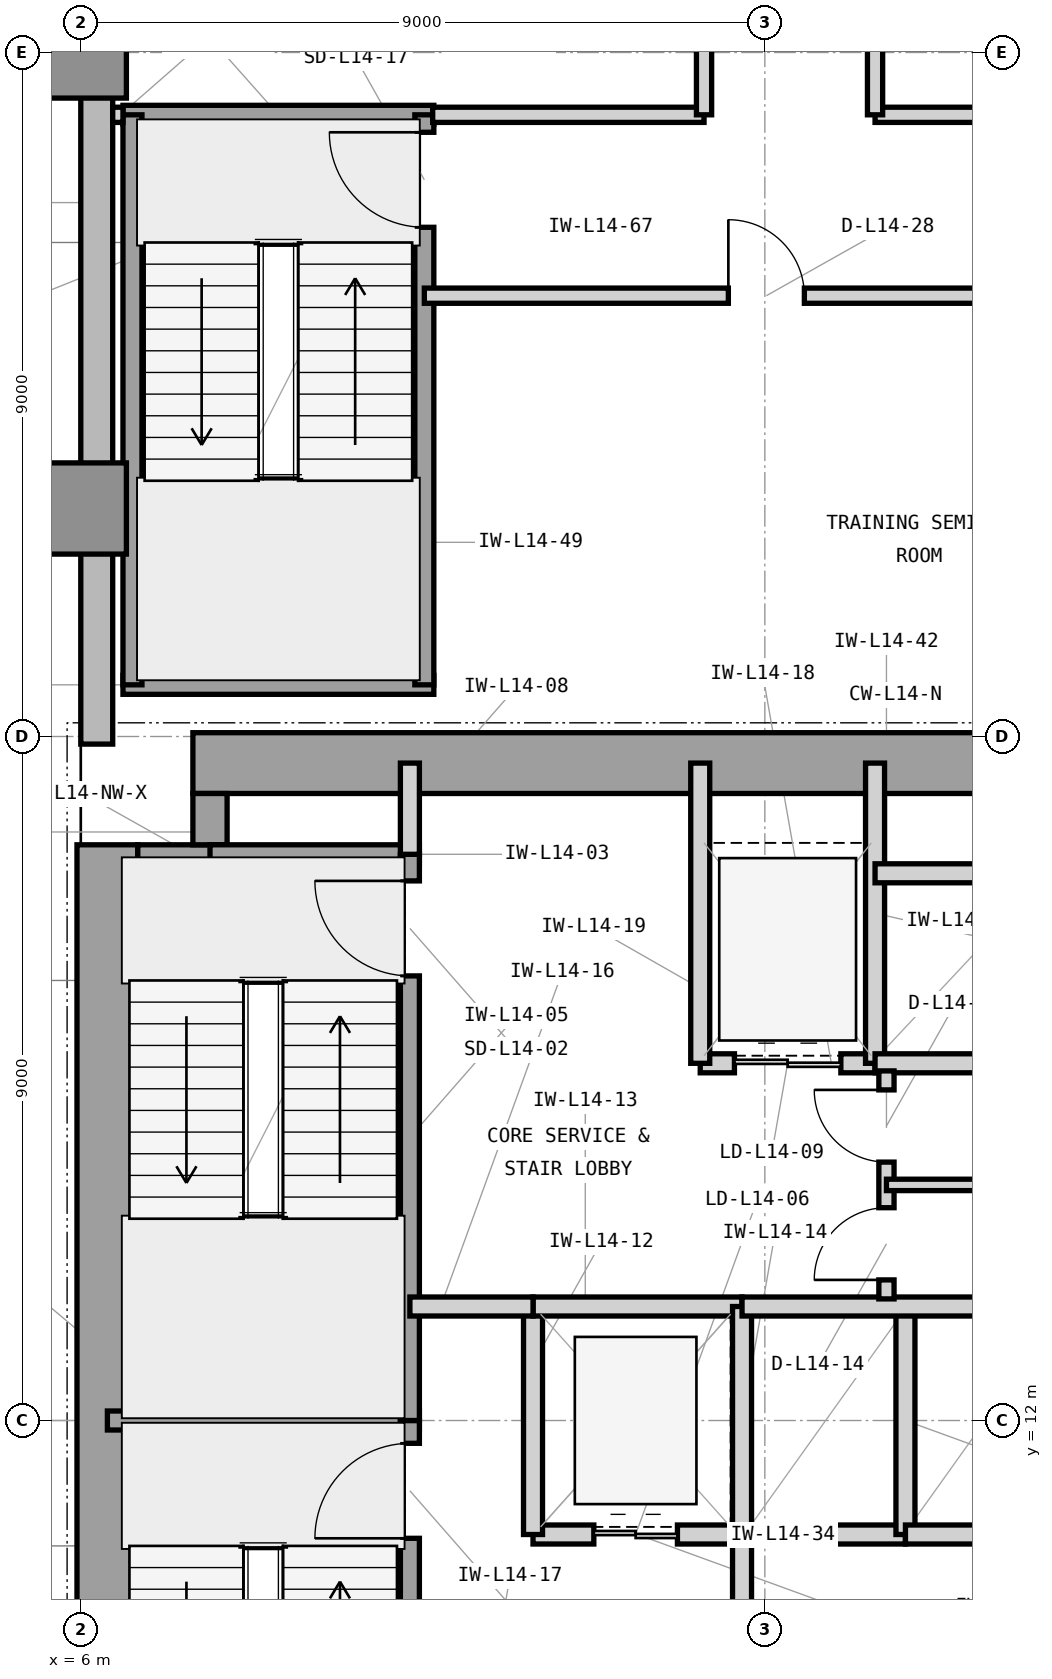
"""IFC4 building model, lengths in metres.
Left out: names, types, materials, properties, quantities, classifications, styles, units other than length and angle.
Written with IfcOpenShell. Run it as: python <this file> out.ifc"""

import sys

from ifc_helpers import new_model, si_unit, direction, frame, frame_2d, origin, origin_2d, place, context, subcontext, project, spatial, rectangle, extrude, element, fill, save


model = new_model("IFC4")
c1 = context("Model", 3, precision=1e-05, world=origin(), true_north=direction((0.0, 1.0)))
c2 = subcontext(c1, "Body", "Model", "MODEL_VIEW")
j1 = project(units=[si_unit("LENGTHUNIT", "METRE"), si_unit("PLANEANGLEUNIT", "RADIAN")], contexts=[c1])
p1 = place(None, origin())
s1 = spatial("IfcSite", under=j1, at=p1, CompositionType="ELEMENT")
p2 = place(p1, origin())
s2 = spatial("IfcBuilding", under=s1, at=p2, CompositionType="ELEMENT")
p3 = place(p2, frame((0.0, 0.0, 63.6)))
s3 = spatial("IfcBuildingStorey", under=s2, at=p3, CompositionType="ELEMENT", Elevation=63.6)
p4 = place(p3, frame((6.35, 4.425, 0.0), z_axis=(0.0, 0.0, 1.0), x_axis=(0.0, 1.0, 0.0)))
e1 = element("IfcWall", 1, at=p4, inside=s3, PredefinedType="SHEAR", context=c2, shape_type="SweptSolid", body=[
    extrude(rectangle(XDim=15.15, YDim=0.8, at=frame_2d((7.575, 0.0))), origin(), (0.0, 0.0, 1.0), 4.2),
])
p5 = place(p3, frame((7.475, 20.65, 0.0), z_axis=(0.0, 0.0, 1.0), x_axis=(1.0, 0.0, 0.0)))
e2 = element("IfcWall", 2, at=p5, inside=s3, PredefinedType="SHEAR", context=c2, shape_type="SweptSolid", body=[
    extrude(rectangle(XDim=12.325, YDim=0.8, at=frame_2d((6.163, 0.0))), origin(), (0.0, 0.0, 1.0), 4.2),
])
p6 = place(p3, frame((6.75, 19.35, 0.0), z_axis=(0.0, 0.0, 1.0), x_axis=(1.0, 0.0, 0.0)))
e3 = element("IfcWall", 3, at=p6, inside=s3, PredefinedType="SHEAR", context=c2, shape_type="SweptSolid", body=[
    extrude(rectangle(XDim=1.175, YDim=0.45, at=frame_2d((0.587, 0.0))), origin(), (0.0, 0.0, 1.0), 4.2),
])
p7 = place(p3, frame((7.7, 19.575, 0.0), z_axis=(0.0, 0.0, 1.0), x_axis=(0.0, 1.0, 0.0)))
e4 = element("IfcWall", 4, at=p7, inside=s3, PredefinedType="SHEAR", context=c2, shape_type="SweptSolid", body=[
    extrude(rectangle(XDim=0.675, YDim=0.45, at=frame_2d((0.337, 0.0))), origin(), (0.0, 0.0, 1.0), 4.2),
])
for number, where, z_axis, x_axis in (
    (5, (6.0, 24.0, 0.0), (0.0, 0.0, 1.0), (1.0, 0.0, 0.0)),
    (6, (6.0, 30.0, 0.0), (0.0, 0.0, 1.0), (1.0, 0.0, 0.0)),
):
    element("IfcColumn", number, at=place(p3, frame(where, z_axis=z_axis, x_axis=x_axis)), inside=s3, PredefinedType="COLUMN", context=c2, shape_type="SweptSolid", body=[
        extrude(rectangle(XDim=1.2, YDim=1.2, at=origin_2d()), origin(), (0.0, 0.0, 1.0), 4.2),
    ])
p8 = place(p3, frame((6.21, 49.4, 0.0), z_axis=(0.0, 0.0, 1.0), x_axis=(0.0, -1.0, 0.0)))
e7 = element("IfcWall", 7, at=p8, inside=s3, PredefinedType="STANDARD", context=c2, shape_type="SweptSolid", body=[
    extrude(rectangle(XDim=28.5, YDim=0.42, at=frame_2d((14.25, 0.0))), origin(), (0.0, 0.0, 1.0), 3.98),
])
p9 = place(p8, frame((15.225, 0.0, 0.85)))
e8 = element("IfcOpeningElement", 8, at=p9, cuts=e7, PredefinedType="OPENING", context=c2, shape_type="SweptSolid", body=[
    extrude(rectangle(XDim=2.8, YDim=2.45, at=frame_2d((1.4, 1.225))), frame((0.0, 0.22, 0.0), z_axis=(0.0, -1.0, 0.0), x_axis=(1.0, 0.0, 0.0)), (0.0, 0.0, 1.0), 0.44),
])
p10 = place(p3, frame((6.35, 12.0, 0.0), z_axis=(0.0, 0.0, 1.0), x_axis=(1.0, 0.0, 0.0)))
e9 = element("IfcWall", 9, at=p10, inside=s3, PredefinedType="SHEAR", context=c2, shape_type="SweptSolid", body=[
    extrude(rectangle(XDim=4.105, YDim=0.25, at=frame_2d((2.052, 0.0))), origin(), (0.0, 0.0, 1.0), 4.2),
])
p11 = place(p3, frame((7.7, 19.45, 0.0), z_axis=(0.0, 0.0, 1.0), x_axis=(1.0, 0.0, 0.0)))
e10 = element("IfcWall", 10, at=p11, inside=s3, PredefinedType="SHEAR", context=c2, shape_type="SweptSolid", body=[
    extrude(rectangle(XDim=2.755, YDim=0.25, at=frame_2d((1.377, 0.0))), origin(), (0.0, 0.0, 1.0), 4.2),
])
p12 = place(p3, frame((10.33, 4.55, 0.0), z_axis=(0.0, 0.0, 1.0), x_axis=(0.0, 1.0, 0.0)))
e11 = element("IfcWall", 11, at=p12, inside=s3, PredefinedType="SHEAR", context=c2, shape_type="SweptSolid", body=[
    extrude(rectangle(XDim=7.45, YDim=0.25, at=frame_2d((3.725, 0.0))), origin(), (0.0, 0.0, 1.0), 4.2),
])
p13 = place(p12, frame((5.9, 0.0, 0.0)))
e12 = element("IfcOpeningElement", 12, at=p13, cuts=e11, PredefinedType="OPENING", context=c2, shape_type="SweptSolid", body=[
    extrude(rectangle(XDim=1.25, YDim=2.2, at=frame_2d((0.625, 1.1))), frame((0.0, 0.135, 0.0), z_axis=(0.0, -1.0, 0.0), x_axis=(1.0, 0.0, 0.0)), (0.0, 0.0, 1.0), 0.27),
])
p14 = place(p3, frame((10.33, 12.0, 0.0), z_axis=(0.0, 0.0, 1.0), x_axis=(0.0, 1.0, 0.0)))
e13 = element("IfcWall", 13, at=p14, inside=s3, PredefinedType="SHEAR", context=c2, shape_type="SweptSolid", body=[
    extrude(rectangle(XDim=7.45, YDim=0.25, at=frame_2d((3.725, 0.0))), origin(), (0.0, 0.0, 1.0), 4.2),
])
p15 = place(p14, frame((5.85, 0.0, 0.0)))
e14 = element("IfcOpeningElement", 14, at=p15, cuts=e13, PredefinedType="OPENING", context=c2, shape_type="SweptSolid", body=[
    extrude(rectangle(XDim=1.25, YDim=2.2, at=frame_2d((0.625, 1.1))), frame((0.0, 0.135, 0.0), z_axis=(0.0, -1.0, 0.0), x_axis=(1.0, 0.0, 0.0)), (0.0, 0.0, 1.0), 0.27),
])
p16 = place(p3, frame((10.33, 19.45, 0.0), z_axis=(0.0, 0.0, 1.0), x_axis=(0.0, 1.0, 0.0)))
e15 = element("IfcWall", 15, at=p16, inside=s3, PredefinedType="PARTITIONING", context=c2, shape_type="SweptSolid", body=[
    extrude(rectangle(XDim=1.2, YDim=0.25, at=frame_2d((0.6, 0.0))), origin(), (0.0, 0.0, 1.0), 3.114),
])
p17 = place(p3, frame((11.95, 10.5, 0.0), z_axis=(0.0, 0.0, 1.0), x_axis=(1.0, 0.0, 0.0)))
e16 = element("IfcWall", 16, at=p17, inside=s3, PredefinedType="PARTITIONING", context=c2, shape_type="SweptSolid", body=[
    extrude(rectangle(XDim=2.75, YDim=0.25, at=frame_2d((1.375, 0.0))), origin(), (0.0, 0.0, 1.0), 3.426),
])
p18 = place(p17, frame((0.8, 0.0, 0.0)))
e17 = element("IfcOpeningElement", 17, at=p18, cuts=e16, PredefinedType="OPENING", context=c2, shape_type="SweptSolid", body=[
    extrude(rectangle(XDim=1.1, YDim=2.25, at=frame_2d((0.55, 1.125))), frame((0.0, 0.135, 0.0), z_axis=(0.0, -1.0, 0.0), x_axis=(1.0, 0.0, 0.0)), (0.0, 0.0, 1.0), 0.27),
])
p19 = place(p3, frame((11.95, 10.5, 0.0), z_axis=(0.0, 0.0, 1.0), x_axis=(0.0, 1.0, 0.0)))
e18 = element("IfcWall", 18, at=p19, inside=s3, PredefinedType="PARTITIONING", context=c2, shape_type="SweptSolid", body=[
    extrude(rectangle(XDim=3.0, YDim=0.25, at=frame_2d((1.5, 0.0))), origin(), (0.0, 0.0, 1.0), 3.97),
])
p20 = place(p3, frame((11.95, 13.5, 0.0), z_axis=(0.0, 0.0, 1.0), x_axis=(1.0, 0.0, 0.0)))
e19 = element("IfcWall", 19, at=p20, inside=s3, PredefinedType="PARTITIONING", context=c2, shape_type="SweptSolid", body=[
    extrude(rectangle(XDim=2.75, YDim=0.25, at=frame_2d((1.375, 0.0))), origin(), (0.0, 0.0, 1.0), 3.426),
])
p21 = place(p3, frame((14.7, 10.5, 0.0), z_axis=(0.0, 0.0, 1.0), x_axis=(0.0, 1.0, 0.0)))
e20 = element("IfcWall", 20, at=p21, inside=s3, PredefinedType="PARTITIONING", context=c2, shape_type="SweptSolid", body=[
    extrude(rectangle(XDim=3.0, YDim=0.25, at=frame_2d((1.5, 0.0))), origin(), (0.0, 0.0, 1.0), 3.97),
])
p22 = place(p3, frame((14.7, 6.7, 0.0), z_axis=(0.0, 0.0, 1.0), x_axis=(0.0, 1.0, 0.0)))
e21 = element("IfcWall", 21, at=p22, inside=s3, PredefinedType="PARTITIONING", context=c2, shape_type="SweptSolid", body=[
    extrude(rectangle(XDim=3.8, YDim=0.25, at=frame_2d((1.9, 0.0))), origin(), (0.0, 0.0, 1.0), 3.97),
])
p23 = place(p22, frame((1.3, 0.0, 0.0)))
e22 = element("IfcOpeningElement", 22, at=p23, cuts=e21, PredefinedType="OPENING", context=c2, shape_type="SweptSolid", body=[
    extrude(rectangle(XDim=1.2, YDim=2.2, at=frame_2d((0.6, 1.1))), frame((0.0, 0.135, 0.0), z_axis=(0.0, -1.0, 0.0), x_axis=(1.0, 0.0, 0.0)), (0.0, 0.0, 1.0), 0.27),
])
p24 = place(p3, frame((10.33, 13.5, 0.0), z_axis=(0.0, 0.0, 1.0), x_axis=(1.0, 0.0, 0.0)))
e23 = element("IfcWall", 23, at=p24, inside=s3, PredefinedType="PARTITIONING", context=c2, shape_type="SweptSolid", body=[
    extrude(rectangle(XDim=1.62, YDim=0.25, at=frame_2d((0.81, 0.0))), origin(), (0.0, 0.0, 1.0), 3.426),
])
p25 = place(p3, frame((14.15, 16.7, 0.0), z_axis=(0.0, 0.0, 1.0), x_axis=(1.0, 0.0, 0.0)))
e24 = element("IfcWall", 24, at=p25, inside=s3, PredefinedType="PARTITIONING", context=c2, shape_type="SweptSolid", body=[
    extrude(rectangle(XDim=2.3, YDim=0.25, at=frame_2d((1.15, 0.0))), origin(), (0.0, 0.0, 1.0), 3.426),
])
p26 = place(p25, frame((0.45, 0.0, 0.0)))
e25 = element("IfcOpeningElement", 25, at=p26, cuts=e24, PredefinedType="OPENING", context=c2, shape_type="SweptSolid", body=[
    extrude(rectangle(XDim=1.4, YDim=2.35, at=frame_2d((0.7, 1.175))), frame((0.0, 0.135, 0.0), z_axis=(0.0, -1.0, 0.0), x_axis=(1.0, 0.0, 0.0)), (0.0, 0.0, 1.0), 0.27),
])
for number, where, z_axis, x_axis in (
    (26, (14.15, 16.7, 0.0), (0.0, 0.0, 1.0), (0.0, 1.0, 0.0)),
    (27, (16.45, 16.7, 0.0), (0.0, 0.0, 1.0), (0.0, 1.0, 0.0)),
):
    element("IfcWall", number, at=place(p3, frame(where, z_axis=z_axis, x_axis=x_axis)), inside=s3, PredefinedType="PARTITIONING", context=c2, shape_type="SweptSolid", body=[
        extrude(rectangle(XDim=3.95, YDim=0.25, at=frame_2d((1.975, 0.0))), origin(), (0.0, 0.0, 1.0), 3.97),
    ])
p27 = place(p3, frame((16.45, 16.7, 0.0), z_axis=(0.0, 0.0, 1.0), x_axis=(1.0, 0.0, 0.0)))
e28 = element("IfcWall", 28, at=p27, inside=s3, PredefinedType="PARTITIONING", context=c2, shape_type="SweptSolid", body=[
    extrude(rectangle(XDim=2.3, YDim=0.25, at=frame_2d((1.15, 0.0))), origin(), (0.0, 0.0, 1.0), 3.426),
])
p28 = place(p3, frame((16.45, 19.2, 0.0), z_axis=(0.0, 0.0, 1.0), x_axis=(1.0, 0.0, 0.0)))
e29 = element("IfcWall", 29, at=p28, inside=s3, PredefinedType="PARTITIONING", context=c2, shape_type="SweptSolid", body=[
    extrude(rectangle(XDim=7.2, YDim=0.25, at=frame_2d((3.6, 0.0))), origin(), (0.0, 0.0, 1.0), 3.97),
])
p29 = place(p3, frame((14.7, 10.5, 0.0), z_axis=(0.0, 0.0, 1.0), x_axis=(1.0, 0.0, 0.0)))
e30 = element("IfcWall", 30, at=p29, inside=s3, PredefinedType="PARTITIONING", context=c2, shape_type="SweptSolid", body=[
    extrude(rectangle(XDim=2.15, YDim=0.25, at=frame_2d((1.075, 0.0))), origin(), (0.0, 0.0, 1.0), 3.426),
])
p30 = place(p3, frame((16.85, 10.5, 0.0), z_axis=(0.0, 0.0, 1.0), x_axis=(0.0, 1.0, 0.0)))
e31 = element("IfcWall", 31, at=p30, inside=s3, PredefinedType="PARTITIONING", context=c2, shape_type="SweptSolid", body=[
    extrude(rectangle(XDim=3.0, YDim=0.25, at=frame_2d((1.5, 0.0))), origin(), (0.0, 0.0, 1.0), 3.97),
])
p31 = place(p3, frame((16.85, 10.5, 0.0), z_axis=(0.0, 0.0, 1.0), x_axis=(1.0, 0.0, 0.0)))
e32 = element("IfcWall", 32, at=p31, inside=s3, PredefinedType="PARTITIONING", context=c2, shape_type="SweptSolid", body=[
    extrude(rectangle(XDim=2.1, YDim=0.25, at=frame_2d((1.05, 0.0))), origin(), (0.0, 0.0, 1.0), 3.426),
])
p32 = place(p3, frame((14.7, 13.5, 0.0), z_axis=(0.0, 0.0, 1.0), x_axis=(1.0, 0.0, 0.0)))
e33 = element("IfcWall", 33, at=p32, inside=s3, PredefinedType="PARTITIONING", context=c2, shape_type="SweptSolid", body=[
    extrude(rectangle(XDim=8.95, YDim=0.25, at=frame_2d((4.475, 0.0))), origin(), (0.0, 0.0, 1.0), 3.426),
])
p33 = place(p3, frame((16.6, 13.6, 0.0), z_axis=(0.0, 0.0, 1.0), x_axis=(0.0, 1.0, 0.0)))
e34 = element("IfcWall", 34, at=p33, inside=s3, PredefinedType="PARTITIONING", context=c2, shape_type="SweptSolid", body=[
    extrude(rectangle(XDim=3.0, YDim=0.2, at=frame_2d((1.5, 0.0))), origin(), (0.0, 0.0, 1.0), 3.97),
])
p34 = place(p33, frame((0.25, 0.0, 0.0)))
e35 = element("IfcOpeningElement", 35, at=p34, cuts=e34, PredefinedType="OPENING", context=c2, shape_type="SweptSolid", body=[
    extrude(rectangle(XDim=0.95, YDim=2.1, at=frame_2d((0.475, 1.05))), frame((0.0, 0.11, 0.0), z_axis=(0.0, -1.0, 0.0), x_axis=(1.0, 0.0, 0.0)), (0.0, 0.0, 1.0), 0.22),
])
p35 = place(p33, frame((1.8, 0.0, 0.0)))
e36 = element("IfcOpeningElement", 36, at=p35, cuts=e34, PredefinedType="OPENING", context=c2, shape_type="SweptSolid", body=[
    extrude(rectangle(XDim=0.95, YDim=2.1, at=frame_2d((0.475, 1.05))), frame((0.0, 0.11, 0.0), z_axis=(0.0, -1.0, 0.0), x_axis=(1.0, 0.0, 0.0)), (0.0, 0.0, 1.0), 0.22),
])
p36 = place(p3, frame((16.6, 15.1, 0.0), z_axis=(0.0, 0.0, 1.0), x_axis=(1.0, 0.0, 0.0)))
e37 = element("IfcWall", 37, at=p36, inside=s3, PredefinedType="PARTITIONING", context=c2, shape_type="SweptSolid", body=[
    extrude(rectangle(XDim=3.95, YDim=0.15, at=frame_2d((1.975, 0.0))), origin(), (0.0, 0.0, 1.0), 3.97),
])
for number, where, z_axis, x_axis in (
    (38, (6.555, 21.68, 0.0), (0.0, 0.0, 1.0), (1.0, 0.0, 0.0)),
    (39, (6.555, 29.18, 0.0), (0.0, 0.0, 1.0), (1.0, 0.0, 0.0)),
):
    element("IfcWall", number, at=place(p3, frame(where, z_axis=z_axis, x_axis=x_axis)), inside=s3, PredefinedType="SHEAR", context=c2, shape_type="SweptSolid", body=[
        extrude(rectangle(XDim=4.09, YDim=0.25, at=frame_2d((2.045, 0.0))), origin(), (0.0, 0.0, 1.0), 4.2),
    ])
p37 = place(p3, frame((6.68, 21.68, 0.0), z_axis=(0.0, 0.0, 1.0), x_axis=(0.0, 1.0, 0.0)))
e40 = element("IfcWall", 40, at=p37, inside=s3, PredefinedType="SHEAR", context=c2, shape_type="SweptSolid", body=[
    extrude(rectangle(XDim=7.5, YDim=0.25, at=frame_2d((3.75, 0.0))), origin(), (0.0, 0.0, 1.0), 4.2),
])
p38 = place(p3, frame((10.52, 21.68, 0.0), z_axis=(0.0, 0.0, 1.0), x_axis=(0.0, 1.0, 0.0)))
e41 = element("IfcWall", 41, at=p38, inside=s3, PredefinedType="SHEAR", context=c2, shape_type="SweptSolid", body=[
    extrude(rectangle(XDim=7.5, YDim=0.25, at=frame_2d((3.75, 0.0))), origin(), (0.0, 0.0, 1.0), 4.2),
])
p39 = place(p38, frame((6.02, 0.0, 0.0)))
e42 = element("IfcOpeningElement", 42, at=p39, cuts=e41, PredefinedType="OPENING", context=c2, shape_type="SweptSolid", body=[
    extrude(rectangle(XDim=1.25, YDim=2.2, at=frame_2d((0.625, 1.1))), frame((0.0, 0.135, 0.0), z_axis=(0.0, -1.0, 0.0), x_axis=(1.0, 0.0, 0.0)), (0.0, 0.0, 1.0), 0.27),
])
p40 = place(p3, frame((10.52, 26.8, 0.0), z_axis=(0.0, 0.0, 1.0), x_axis=(1.0, 0.0, 0.0)))
e43 = element("IfcWall", 43, at=p40, inside=s3, PredefinedType="PARTITIONING", context=c2, shape_type="SweptSolid", body=[
    extrude(rectangle(XDim=9.28, YDim=0.2, at=frame_2d((4.64, 0.0))), origin(), (0.0, 0.0, 1.0), 3.97),
])
p41 = place(p40, frame((4.0, 0.0, 0.0)))
e44 = element("IfcOpeningElement", 44, at=p41, cuts=e43, PredefinedType="OPENING", context=c2, shape_type="SweptSolid", body=[
    extrude(rectangle(XDim=1.0, YDim=2.15, at=frame_2d((0.5, 1.075))), frame((0.0, 0.11, 0.0), z_axis=(0.0, -1.0, 0.0), x_axis=(1.0, 0.0, 0.0)), (0.0, 0.0, 1.0), 0.22),
])
p42 = place(p3, frame((6.42, 29.18, 0.0), z_axis=(0.0, 0.0, 1.0), x_axis=(1.0, 0.0, 0.0)))
e45 = element("IfcWall", 45, at=p42, inside=s3, PredefinedType="PARTITIONING", context=c2, shape_type="SweptSolid", body=[
    extrude(rectangle(XDim=0.135, YDim=0.2, at=frame_2d((0.067, 0.0))), origin(), (0.0, 0.0, 1.0), 3.97),
])
p43 = place(p3, frame((10.63, 29.18, 0.0), z_axis=(0.0, 0.0, 1.0), x_axis=(1.0, 0.0, 0.0)))
e46 = element("IfcWall", 46, at=p43, inside=s3, PredefinedType="PARTITIONING", context=c2, shape_type="SweptSolid", body=[
    extrude(rectangle(XDim=3.57, YDim=0.2, at=frame_2d((1.785, 0.0))), origin(), (0.0, 0.0, 1.0), 3.97),
])
p44 = place(p3, frame((16.45, 29.18, 0.0), z_axis=(0.0, 0.0, 1.0), x_axis=(1.0, 0.0, 0.0)))
e47 = element("IfcWall", 47, at=p44, inside=s3, PredefinedType="PARTITIONING", context=c2, shape_type="SweptSolid", body=[
    extrude(rectangle(XDim=7.37, YDim=0.2, at=frame_2d((3.685, 0.0))), origin(), (0.0, 0.0, 1.0), 3.97),
])
p45 = place(p3, frame((14.2, 29.18, 0.0), z_axis=(0.0, 0.0, 1.0), x_axis=(0.0, 1.0, 0.0)))
e48 = element("IfcWall", 48, at=p45, inside=s3, PredefinedType="PARTITIONING", context=c2, shape_type="SweptSolid", body=[
    extrude(rectangle(XDim=11.32, YDim=0.2, at=frame_2d((5.66, 0.0))), origin(), (0.0, 0.0, 1.0), 3.97),
])
p46 = place(p45, frame((5.16, 0.0, 0.0)))
e49 = element("IfcOpeningElement", 49, at=p46, cuts=e48, PredefinedType="OPENING", context=c2, shape_type="SweptSolid", body=[
    extrude(rectangle(XDim=1.0, YDim=2.15, at=frame_2d((0.5, 1.075))), frame((0.0, 0.11, 0.0), z_axis=(0.0, -1.0, 0.0), x_axis=(1.0, 0.0, 0.0)), (0.0, 0.0, 1.0), 0.22),
])
p47 = place(p3, frame((16.45, 29.18, 0.0), z_axis=(0.0, 0.0, 1.0), x_axis=(0.0, 1.0, 0.0)))
e50 = element("IfcWall", 50, at=p47, inside=s3, PredefinedType="PARTITIONING", context=c2, shape_type="SweptSolid", body=[
    extrude(rectangle(XDim=7.5, YDim=0.2, at=frame_2d((3.75, 0.0))), origin(), (0.0, 0.0, 1.0), 3.97),
])
p48 = place(p47, frame((3.25, 0.0, 0.0)))
e51 = element("IfcOpeningElement", 51, at=p48, cuts=e50, PredefinedType="OPENING", context=c2, shape_type="SweptSolid", body=[
    extrude(rectangle(XDim=1.0, YDim=2.15, at=frame_2d((0.5, 1.075))), frame((0.0, 0.11, 0.0), z_axis=(0.0, -1.0, 0.0), x_axis=(1.0, 0.0, 0.0)), (0.0, 0.0, 1.0), 0.22),
])
p49 = place(p13, origin())
e52 = element("IfcDoor", 52, at=p49, inside=s3, OperationType="SINGLE_SWING_LEFT", PredefinedType="DOOR", context=c2, shape_type="SweptSolid", body=[
    extrude(rectangle(XDim=1.25, YDim=2.2, at=frame_2d((0.625, 1.1))), frame((0.0, 0.025, 0.0), z_axis=(0.0, -1.0, 0.0), x_axis=(1.0, 0.0, 0.0)), (0.0, 0.0, 1.0), 0.05),
])
fill(e12, e52)
p50 = place(p15, origin())
e53 = element("IfcDoor", 53, at=p50, inside=s3, OperationType="SINGLE_SWING_RIGHT", PredefinedType="DOOR", context=c2, shape_type="SweptSolid", body=[
    extrude(rectangle(XDim=1.25, YDim=2.2, at=frame_2d((0.625, 1.1))), frame((0.0, 0.025, 0.0), z_axis=(0.0, -1.0, 0.0), x_axis=(1.0, 0.0, 0.0)), (0.0, 0.0, 1.0), 0.05),
])
fill(e14, e53)
p51 = place(p18, origin())
e54 = element("IfcDoor", 54, at=p51, inside=s3, OperationType="DOUBLE_DOOR_SLIDING", PredefinedType="DOOR", context=c2, shape_type="SweptSolid", body=[
    extrude(rectangle(XDim=1.1, YDim=2.25, at=frame_2d((0.55, 1.125))), frame((0.0, 0.025, 0.0), z_axis=(0.0, -1.0, 0.0), x_axis=(1.0, 0.0, 0.0)), (0.0, 0.0, 1.0), 0.05),
])
fill(e17, e54)
p52 = place(p26, origin())
e55 = element("IfcDoor", 55, at=p52, inside=s3, OperationType="DOUBLE_DOOR_SLIDING", PredefinedType="DOOR", context=c2, shape_type="SweptSolid", body=[
    extrude(rectangle(XDim=1.4, YDim=2.35, at=frame_2d((0.7, 1.175))), frame((0.0, 0.025, 0.0), z_axis=(0.0, -1.0, 0.0), x_axis=(1.0, 0.0, 0.0)), (0.0, 0.0, 1.0), 0.05),
])
fill(e25, e55)
p53 = place(p34, origin())
e56 = element("IfcDoor", 56, at=p53, inside=s3, OperationType="SINGLE_SWING_LEFT", PredefinedType="DOOR", context=c2, shape_type="SweptSolid", body=[
    extrude(rectangle(XDim=0.95, YDim=2.1, at=frame_2d((0.475, 1.05))), frame((0.0, 0.025, 0.0), z_axis=(0.0, -1.0, 0.0), x_axis=(1.0, 0.0, 0.0)), (0.0, 0.0, 1.0), 0.05),
])
fill(e35, e56)
p54 = place(p35, origin())
e57 = element("IfcDoor", 57, at=p54, inside=s3, OperationType="SINGLE_SWING_RIGHT", PredefinedType="DOOR", context=c2, shape_type="SweptSolid", body=[
    extrude(rectangle(XDim=0.95, YDim=2.1, at=frame_2d((0.475, 1.05))), frame((0.0, 0.025, 0.0), z_axis=(0.0, -1.0, 0.0), x_axis=(1.0, 0.0, 0.0)), (0.0, 0.0, 1.0), 0.05),
])
fill(e36, e57)
p55 = place(p39, origin())
e58 = element("IfcDoor", 58, at=p55, inside=s3, OperationType="SINGLE_SWING_RIGHT", PredefinedType="DOOR", context=c2, shape_type="SweptSolid", body=[
    extrude(rectangle(XDim=1.25, YDim=2.2, at=frame_2d((0.625, 1.1))), frame((0.0, 0.025, 0.0), z_axis=(0.0, -1.0, 0.0), x_axis=(1.0, 0.0, 0.0)), (0.0, 0.0, 1.0), 0.05),
])
fill(e42, e58)
p56 = place(p41, origin())
e59 = element("IfcDoor", 59, at=p56, inside=s3, OperationType="SINGLE_SWING_LEFT", PredefinedType="DOOR", context=c2, shape_type="SweptSolid", body=[
    extrude(rectangle(XDim=1.0, YDim=2.15, at=frame_2d((0.5, 1.075))), frame((0.0, 0.025, 0.0), z_axis=(0.0, -1.0, 0.0), x_axis=(1.0, 0.0, 0.0)), (0.0, 0.0, 1.0), 0.05),
])
fill(e44, e59)
save(model, sys.argv[1])
